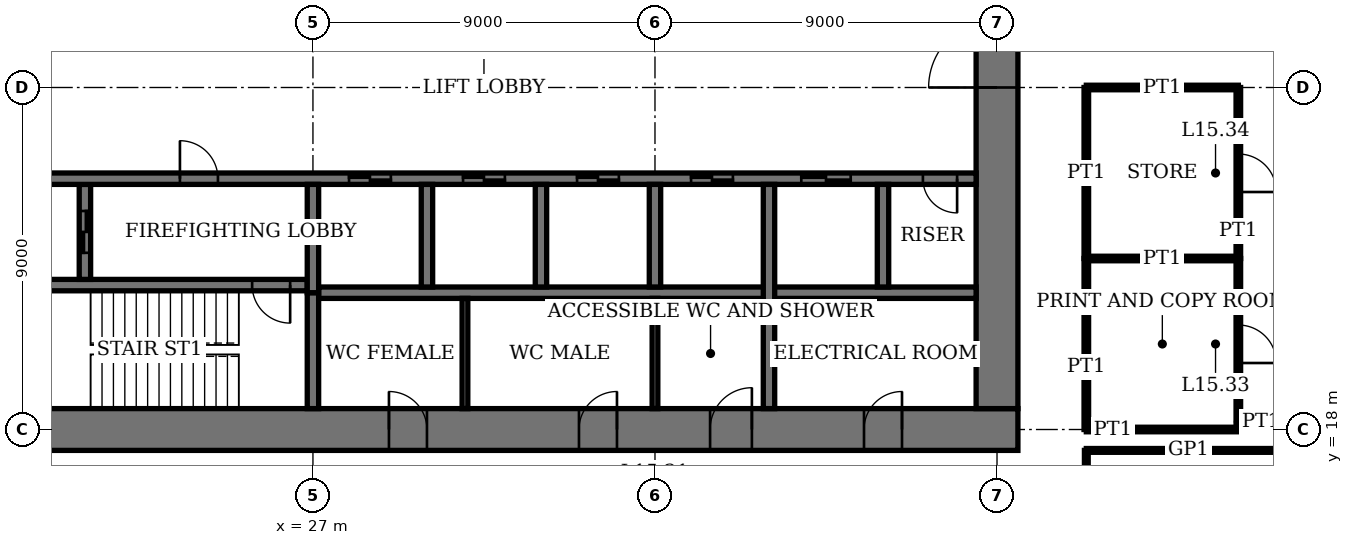
"""IFC4 building model, lengths in metres.
Left out: names, types, materials, properties, quantities, classifications, styles, units other than length and angle.
Written with IfcOpenShell. Run it as: python <this file> out.ifc"""

import sys

from ifc_helpers import new_model, si_unit, direction, frame, frame_2d, origin, place, context, subcontext, project, spatial, rectangle, extrude, element, fill, save


model = new_model("IFC4")
c1 = context("Model", 3, precision=1e-05, world=origin(), true_north=direction((0.0, 1.0)))
c2 = subcontext(c1, "Body", "Model", "MODEL_VIEW")
j1 = project(units=[si_unit("LENGTHUNIT", "METRE"), si_unit("PLANEANGLEUNIT", "RADIAN")], contexts=[c1])
p1 = place(None, origin())
s1 = spatial("IfcSite", under=j1, at=p1, CompositionType="ELEMENT")
p2 = place(p1, origin())
s2 = spatial("IfcBuilding", under=s1, at=p2, CompositionType="ELEMENT")
p3 = place(p2, frame((0.0, 0.0, 63.8)))
s3 = spatial("IfcBuildingStorey", under=s2, at=p3, CompositionType="ELEMENT", Elevation=63.8)
p4 = place(p3, frame((17.45, 18.0, 0.0), z_axis=(0.0, 0.0, 1.0), x_axis=(1.0, 0.0, 0.0)))
e1 = element("IfcWall", 1, at=p4, inside=s3, PredefinedType="SHEAR", context=c2, shape_type="SweptSolid", body=[
    extrude(rectangle(XDim=28.1, YDim=1.1, at=frame_2d((14.05, 0.0))), origin(), (0.0, 0.0, 1.0), 4.0),
])
p5 = place(p4, frame((11.55, 0.0, 0.0)))
e2 = element("IfcOpeningElement", 2, at=p5, cuts=e1, PredefinedType="OPENING", context=c2, shape_type="SweptSolid", body=[
    extrude(rectangle(XDim=1.0, YDim=2.4, at=frame_2d((0.5, 1.2))), frame((0.0, 0.56, 0.0), z_axis=(0.0, -1.0, 0.0), x_axis=(1.0, 0.0, 0.0)), (0.0, 0.0, 1.0), 1.12),
])
p6 = place(p4, frame((16.55, 0.0, 0.0)))
e3 = element("IfcOpeningElement", 3, at=p6, cuts=e1, PredefinedType="OPENING", context=c2, shape_type="SweptSolid", body=[
    extrude(rectangle(XDim=1.0, YDim=2.4, at=frame_2d((0.5, 1.2))), frame((0.0, 0.56, 0.0), z_axis=(0.0, -1.0, 0.0), x_axis=(1.0, 0.0, 0.0)), (0.0, 0.0, 1.0), 1.12),
])
p7 = place(p4, frame((20.0, 0.0, 0.0)))
e4 = element("IfcOpeningElement", 4, at=p7, cuts=e1, PredefinedType="OPENING", context=c2, shape_type="SweptSolid", body=[
    extrude(rectangle(XDim=1.1, YDim=2.4, at=frame_2d((0.55, 1.2))), frame((0.0, 0.56, 0.0), z_axis=(0.0, -1.0, 0.0), x_axis=(1.0, 0.0, 0.0)), (0.0, 0.0, 1.0), 1.12),
])
p8 = place(p4, frame((24.05, 0.0, 0.0)))
e5 = element("IfcOpeningElement", 5, at=p8, cuts=e1, PredefinedType="OPENING", context=c2, shape_type="SweptSolid", body=[
    extrude(rectangle(XDim=1.0, YDim=2.4, at=frame_2d((0.5, 1.2))), frame((0.0, 0.56, 0.0), z_axis=(0.0, -1.0, 0.0), x_axis=(1.0, 0.0, 0.0)), (0.0, 0.0, 1.0), 1.12),
])
p9 = place(p3, frame((45.0, 18.55, 0.0), z_axis=(0.0, 0.0, 1.0), x_axis=(0.0, 1.0, 0.0)))
e6 = element("IfcWall", 6, at=p9, inside=s3, PredefinedType="SHEAR", context=c2, shape_type="SweptSolid", body=[
    extrude(rectangle(XDim=16.9, YDim=1.1, at=frame_2d((8.45, 0.0))), origin(), (0.0, 0.0, 1.0), 4.0),
])
p10 = place(p9, frame((8.45, 0.0, 0.0)))
e7 = element("IfcOpeningElement", 7, at=p10, cuts=e6, PredefinedType="OPENING", context=c2, shape_type="SweptSolid", body=[
    extrude(rectangle(XDim=1.8, YDim=2.4, at=frame_2d((0.9, 1.2))), frame((0.0, 0.56, 0.0), z_axis=(0.0, -1.0, 0.0), x_axis=(1.0, 0.0, 0.0)), (0.0, 0.0, 1.0), 1.12),
])
p11 = place(p3, frame((18.55, 21.8, 0.0), z_axis=(0.0, 0.0, 1.0), x_axis=(1.0, 0.0, 0.0)))
e8 = element("IfcWall", 8, at=p11, inside=s3, PredefinedType="SHEAR", context=c2, shape_type="SweptSolid", body=[
    extrude(rectangle(XDim=8.3, YDim=0.3, at=frame_2d((4.15, 0.0))), origin(), (0.0, 0.0, 1.0), 4.0),
])
p12 = place(p11, frame((6.85, 0.0, 0.0)))
e9 = element("IfcOpeningElement", 9, at=p12, cuts=e8, PredefinedType="OPENING", context=c2, shape_type="SweptSolid", body=[
    extrude(rectangle(XDim=1.0, YDim=2.4, at=frame_2d((0.5, 1.2))), frame((0.0, 0.16, 0.0), z_axis=(0.0, -1.0, 0.0), x_axis=(1.0, 0.0, 0.0)), (0.0, 0.0, 1.0), 0.32),
])
p13 = place(p3, frame((27.0, 18.55, 0.0), z_axis=(0.0, 0.0, 1.0), x_axis=(0.0, 1.0, 0.0)))
e10 = element("IfcWall", 10, at=p13, inside=s3, PredefinedType="SHEAR", context=c2, shape_type="SweptSolid", body=[
    extrude(rectangle(XDim=3.05, YDim=0.3, at=frame_2d((1.525, 0.0))), origin(), (0.0, 0.0, 1.0), 4.0),
])
p14 = place(p3, frame((21.0, 21.95, 0.0), z_axis=(0.0, 0.0, 1.0), x_axis=(0.0, 1.0, 0.0)))
e11 = element("IfcWall", 11, at=p14, inside=s3, PredefinedType="SHEAR", context=c2, shape_type="SweptSolid", body=[
    extrude(rectangle(XDim=2.5, YDim=0.3, at=frame_2d((1.25, 0.0))), origin(), (0.0, 0.0, 1.0), 4.0),
])
p15 = place(p14, frame((0.7, 0.0, 0.0)))
e12 = element("IfcOpeningElement", 12, at=p15, cuts=e11, PredefinedType="OPENING", context=c2, shape_type="SweptSolid", body=[
    extrude(rectangle(XDim=1.1, YDim=2.4, at=frame_2d((0.55, 1.2))), frame((0.0, 0.16, 0.0), z_axis=(0.0, -1.0, 0.0), x_axis=(1.0, 0.0, 0.0)), (0.0, 0.0, 1.0), 0.32),
])
p16 = place(p3, frame((18.55, 24.6, 0.0), z_axis=(0.0, 0.0, 1.0), x_axis=(1.0, 0.0, 0.0)))
e13 = element("IfcWall", 13, at=p16, inside=s3, PredefinedType="SHEAR", context=c2, shape_type="SweptSolid", body=[
    extrude(rectangle(XDim=25.9, YDim=0.3, at=frame_2d((12.95, 0.0))), origin(), (0.0, 0.0, 1.0), 4.0),
])
p17 = place(p16, frame((4.95, 0.0, 0.0)))
e14 = element("IfcOpeningElement", 14, at=p17, cuts=e13, PredefinedType="OPENING", context=c2, shape_type="SweptSolid", body=[
    extrude(rectangle(XDim=1.0, YDim=2.4, at=frame_2d((0.5, 1.2))), frame((0.0, 0.16, 0.0), z_axis=(0.0, -1.0, 0.0), x_axis=(1.0, 0.0, 0.0)), (0.0, 0.0, 1.0), 0.32),
])
p18 = place(p16, frame((24.5, 0.0, 0.0)))
e15 = element("IfcOpeningElement", 15, at=p18, cuts=e13, PredefinedType="OPENING", context=c2, shape_type="SweptSolid", body=[
    extrude(rectangle(XDim=0.9, YDim=2.1, at=frame_2d((0.45, 1.05))), frame((0.0, 0.16, 0.0), z_axis=(0.0, -1.0, 0.0), x_axis=(1.0, 0.0, 0.0)), (0.0, 0.0, 1.0), 0.32),
])
p19 = place(p16, frame((9.4, 0.0, 0.0)))
e16 = element("IfcOpeningElement", 16, at=p19, cuts=e13, PredefinedType="OPENING", context=c2, shape_type="SweptSolid", body=[
    extrude(rectangle(XDim=1.1, YDim=2.4, at=frame_2d((0.55, 1.2))), frame((0.0, 0.16, 0.0), z_axis=(0.0, -1.0, 0.0), x_axis=(1.0, 0.0, 0.0)), (0.0, 0.0, 1.0), 0.32),
])
p20 = place(p16, frame((12.4, 0.0, 0.0)))
e17 = element("IfcOpeningElement", 17, at=p20, cuts=e13, PredefinedType="OPENING", context=c2, shape_type="SweptSolid", body=[
    extrude(rectangle(XDim=1.1, YDim=2.4, at=frame_2d((0.55, 1.2))), frame((0.0, 0.16, 0.0), z_axis=(0.0, -1.0, 0.0), x_axis=(1.0, 0.0, 0.0)), (0.0, 0.0, 1.0), 0.32),
])
p21 = place(p16, frame((15.4, 0.0, 0.0)))
e18 = element("IfcOpeningElement", 18, at=p21, cuts=e13, PredefinedType="OPENING", context=c2, shape_type="SweptSolid", body=[
    extrude(rectangle(XDim=1.1, YDim=2.4, at=frame_2d((0.55, 1.2))), frame((0.0, 0.16, 0.0), z_axis=(0.0, -1.0, 0.0), x_axis=(1.0, 0.0, 0.0)), (0.0, 0.0, 1.0), 0.32),
])
p22 = place(p16, frame((18.4, 0.0, 0.0)))
e19 = element("IfcOpeningElement", 19, at=p22, cuts=e13, PredefinedType="OPENING", context=c2, shape_type="SweptSolid", body=[
    extrude(rectangle(XDim=1.1, YDim=2.4, at=frame_2d((0.55, 1.2))), frame((0.0, 0.16, 0.0), z_axis=(0.0, -1.0, 0.0), x_axis=(1.0, 0.0, 0.0)), (0.0, 0.0, 1.0), 0.32),
])
p23 = place(p16, frame((21.3, 0.0, 0.0)))
e20 = element("IfcOpeningElement", 20, at=p23, cuts=e13, PredefinedType="OPENING", context=c2, shape_type="SweptSolid", body=[
    extrude(rectangle(XDim=1.3, YDim=2.4, at=frame_2d((0.65, 1.2))), frame((0.0, 0.16, 0.0), z_axis=(0.0, -1.0, 0.0), x_axis=(1.0, 0.0, 0.0)), (0.0, 0.0, 1.0), 0.32),
])
p24 = place(p3, frame((27.15, 21.6, 0.0), z_axis=(0.0, 0.0, 1.0), x_axis=(1.0, 0.0, 0.0)))
e21 = element("IfcWall", 21, at=p24, inside=s3, PredefinedType="SHEAR", context=c2, shape_type="SweptSolid", body=[
    extrude(rectangle(XDim=17.3, YDim=0.3, at=frame_2d((8.65, 0.0))), origin(), (0.0, 0.0, 1.0), 4.0),
])
for number, where, z_axis, x_axis in (
    (22, (30.0, 21.75, 0.0), (0.0, 0.0, 1.0), (0.0, 1.0, 0.0)),
    (23, (33.0, 21.75, 0.0), (0.0, 0.0, 1.0), (0.0, 1.0, 0.0)),
    (24, (36.0, 21.75, 0.0), (0.0, 0.0, 1.0), (0.0, 1.0, 0.0)),
):
    element("IfcWall", number, at=place(p3, frame(where, z_axis=z_axis, x_axis=x_axis)), inside=s3, PredefinedType="SHEAR", context=c2, shape_type="SweptSolid", body=[
        extrude(rectangle(XDim=2.7, YDim=0.3, at=frame_2d((1.35, 0.0))), origin(), (0.0, 0.0, 1.0), 4.0),
    ])
p25 = place(p3, frame((39.0, 18.55, 0.0), z_axis=(0.0, 0.0, 1.0), x_axis=(0.0, 1.0, 0.0)))
e25 = element("IfcWall", 25, at=p25, inside=s3, PredefinedType="SHEAR", context=c2, shape_type="SweptSolid", body=[
    extrude(rectangle(XDim=5.9, YDim=0.3, at=frame_2d((2.95, 0.0))), origin(), (0.0, 0.0, 1.0), 4.0),
])
p26 = place(p3, frame((42.0, 21.75, 0.0), z_axis=(0.0, 0.0, 1.0), x_axis=(0.0, 1.0, 0.0)))
e26 = element("IfcWall", 26, at=p26, inside=s3, PredefinedType="SHEAR", context=c2, shape_type="SweptSolid", body=[
    extrude(rectangle(XDim=2.7, YDim=0.3, at=frame_2d((1.35, 0.0))), origin(), (0.0, 0.0, 1.0), 4.0),
])
p27 = place(p3, frame((27.0, 21.6, 0.0), z_axis=(0.0, 0.0, 1.0), x_axis=(0.0, 1.0, 0.0)))
e27 = element("IfcWall", 27, at=p27, inside=s3, PredefinedType="SHEAR", context=c2, shape_type="SweptSolid", body=[
    extrude(rectangle(XDim=2.85, YDim=0.3, at=frame_2d((1.425, 0.0))), origin(), (0.0, 0.0, 1.0), 4.0),
])
p28 = place(p3, frame((47.35, 17.45, 0.0), z_axis=(0.0, 0.0, 1.0), x_axis=(1.0, 0.0, 0.0)))
e28 = element("IfcWall", 28, at=p28, inside=s3, PredefinedType="PARTITIONING", context=c2, shape_type="SweptSolid", body=[
    extrude(rectangle(XDim=5.575, YDim=0.1, at=frame_2d((2.788, 0.0))), origin(), (0.0, 0.0, 1.0), 3.05),
])
p29 = place(p3, frame((47.35, 18.0, 0.0), z_axis=(0.0, 0.0, 1.0), x_axis=(1.0, 0.0, 0.0)))
e29 = element("IfcWall", 29, at=p29, inside=s3, PredefinedType="PARTITIONING", context=c2, shape_type="SweptSolid", body=[
    extrude(rectangle(XDim=4.0, YDim=0.12, at=frame_2d((2.0, 0.0))), origin(), (0.0, 0.0, 1.0), 3.05),
])
p30 = place(p3, frame((47.35, 22.5, 0.0), z_axis=(0.0, 0.0, 1.0), x_axis=(1.0, 0.0, 0.0)))
e30 = element("IfcWall", 30, at=p30, inside=s3, PredefinedType="PARTITIONING", context=c2, shape_type="SweptSolid", body=[
    extrude(rectangle(XDim=4.0, YDim=0.12, at=frame_2d((2.0, 0.0))), origin(), (0.0, 0.0, 1.0), 3.1),
])
p31 = place(p3, frame((47.35, 27.0, 0.0), z_axis=(0.0, 0.0, 1.0), x_axis=(1.0, 0.0, 0.0)))
e31 = element("IfcWall", 31, at=p31, inside=s3, PredefinedType="PARTITIONING", context=c2, shape_type="SweptSolid", body=[
    extrude(rectangle(XDim=4.0, YDim=0.12, at=frame_2d((2.0, 0.0))), origin(), (0.0, 0.0, 1.0), 3.05),
])
for number, where, z_axis, x_axis in (
    (32, (47.35, 18.0, 0.0), (0.0, 0.0, 1.0), (0.0, 1.0, 0.0)),
    (33, (47.35, 22.5, 0.0), (0.0, 0.0, 1.0), (0.0, 1.0, 0.0)),
):
    element("IfcWall", number, at=place(p3, frame(where, z_axis=z_axis, x_axis=x_axis)), inside=s3, PredefinedType="PARTITIONING", context=c2, shape_type="SweptSolid", body=[
        extrude(rectangle(XDim=4.5, YDim=0.12, at=frame_2d((2.25, 0.0))), origin(), (0.0, 0.0, 1.0), 3.75),
    ])
p32 = place(p3, frame((47.35, 15.65, 0.0), z_axis=(0.0, 0.0, 1.0), x_axis=(0.0, 1.0, 0.0)))
e34 = element("IfcWall", 34, at=p32, inside=s3, PredefinedType="PARTITIONING", context=c2, shape_type="SweptSolid", body=[
    extrude(rectangle(XDim=1.8, YDim=0.1, at=frame_2d((0.9, 0.0))), origin(), (0.0, 0.0, 1.0), 3.75),
])
p33 = place(p3, frame((51.35, 18.0, 0.0), z_axis=(0.0, 0.0, 1.0), x_axis=(0.0, 1.0, 0.0)))
e35 = element("IfcWall", 35, at=p33, inside=s3, PredefinedType="PARTITIONING", context=c2, shape_type="SweptSolid", body=[
    extrude(rectangle(XDim=4.5, YDim=0.12, at=frame_2d((2.25, 0.0))), origin(), (0.0, 0.0, 1.0), 3.75),
])
p34 = place(p33, frame((1.75, 0.0, 0.0)))
e36 = element("IfcOpeningElement", 36, at=p34, cuts=e35, PredefinedType="OPENING", context=c2, shape_type="SweptSolid", body=[
    extrude(rectangle(XDim=1.0, YDim=2.4, at=frame_2d((0.5, 1.2))), frame((0.0, 0.07, 0.0), z_axis=(0.0, -1.0, 0.0), x_axis=(1.0, 0.0, 0.0)), (0.0, 0.0, 1.0), 0.14),
])
p35 = place(p3, frame((51.35, 22.5, 0.0), z_axis=(0.0, 0.0, 1.0), x_axis=(0.0, 1.0, 0.0)))
e37 = element("IfcWall", 37, at=p35, inside=s3, PredefinedType="PARTITIONING", context=c2, shape_type="SweptSolid", body=[
    extrude(rectangle(XDim=4.5, YDim=0.12, at=frame_2d((2.25, 0.0))), origin(), (0.0, 0.0, 1.0), 3.75),
])
p36 = place(p35, frame((1.75, 0.0, 0.0)))
e38 = element("IfcOpeningElement", 38, at=p36, cuts=e37, PredefinedType="OPENING", context=c2, shape_type="SweptSolid", body=[
    extrude(rectangle(XDim=1.0, YDim=2.4, at=frame_2d((0.5, 1.2))), frame((0.0, 0.07, 0.0), z_axis=(0.0, -1.0, 0.0), x_axis=(1.0, 0.0, 0.0)), (0.0, 0.0, 1.0), 0.14),
])
for number, where, z_axis, x_axis in (
    (39, (31.0, 18.55, 0.0), (0.0, 0.0, 1.0), (0.0, 1.0, 0.0)),
    (40, (36.0, 18.55, 0.0), (0.0, 0.0, 1.0), (0.0, 1.0, 0.0)),
):
    element("IfcWall", number, at=place(p3, frame(where, z_axis=z_axis, x_axis=x_axis)), inside=s3, PredefinedType="PARTITIONING", context=c2, shape_type="SweptSolid", body=[
        extrude(rectangle(XDim=2.9, YDim=0.15, at=frame_2d((1.45, 0.0))), origin(), (0.0, 0.0, 1.0), 3.75),
    ])
p37 = place(p10, origin())
e41 = element("IfcDoor", 41, at=p37, inside=s3, OperationType="DOUBLE_DOOR_DOUBLE_SWING", PredefinedType="DOOR", context=c2, shape_type="SweptSolid", body=[
    extrude(rectangle(XDim=1.8, YDim=2.4, at=frame_2d((0.9, 1.2))), frame((0.0, 0.03, 0.0), z_axis=(0.0, -1.0, 0.0), x_axis=(1.0, 0.0, 0.0)), (0.0, 0.0, 1.0), 0.06),
    extrude(rectangle(XDim=0.04, YDim=2.4, at=frame_2d((0.02, 1.2))), frame((0.0, 0.55, 0.0), z_axis=(0.0, -1.0, 0.0), x_axis=(1.0, 0.0, 0.0)), (0.0, 0.0, 1.0), 1.1),
    extrude(rectangle(XDim=0.04, YDim=2.4, at=frame_2d((1.78, 1.2))), frame((0.0, 0.55, 0.0), z_axis=(0.0, -1.0, 0.0), x_axis=(1.0, 0.0, 0.0)), (0.0, 0.0, 1.0), 1.1),
    extrude(rectangle(XDim=1.8, YDim=0.04, at=frame_2d((0.9, 2.38))), frame((0.0, 0.55, 0.0), z_axis=(0.0, -1.0, 0.0), x_axis=(1.0, 0.0, 0.0)), (0.0, 0.0, 1.0), 1.1),
])
fill(e7, e41)
p38 = place(p5, origin())
e42 = element("IfcDoor", 42, at=p38, inside=s3, OperationType="SINGLE_SWING_RIGHT", PredefinedType="DOOR", context=c2, shape_type="SweptSolid", body=[
    extrude(rectangle(XDim=1.0, YDim=2.4, at=frame_2d((0.5, 1.2))), frame((0.0, 0.025, 0.0), z_axis=(0.0, -1.0, 0.0), x_axis=(1.0, 0.0, 0.0)), (0.0, 0.0, 1.0), 0.05),
    extrude(rectangle(XDim=0.04, YDim=2.4, at=frame_2d((0.02, 1.2))), frame((0.0, 0.4, 0.0), z_axis=(0.0, -1.0, 0.0), x_axis=(1.0, 0.0, 0.0)), (0.0, 0.0, 1.0), 0.8),
    extrude(rectangle(XDim=0.04, YDim=2.4, at=frame_2d((0.98, 1.2))), frame((0.0, 0.4, 0.0), z_axis=(0.0, -1.0, 0.0), x_axis=(1.0, 0.0, 0.0)), (0.0, 0.0, 1.0), 0.8),
    extrude(rectangle(XDim=1.0, YDim=0.04, at=frame_2d((0.5, 2.38))), frame((0.0, 0.4, 0.0), z_axis=(0.0, -1.0, 0.0), x_axis=(1.0, 0.0, 0.0)), (0.0, 0.0, 1.0), 0.8),
])
fill(e2, e42)
p39 = place(p6, origin())
e43 = element("IfcDoor", 43, at=p39, inside=s3, OperationType="SINGLE_SWING_LEFT", PredefinedType="DOOR", context=c2, shape_type="SweptSolid", body=[
    extrude(rectangle(XDim=1.0, YDim=2.4, at=frame_2d((0.5, 1.2))), frame((0.0, 0.025, 0.0), z_axis=(0.0, -1.0, 0.0), x_axis=(1.0, 0.0, 0.0)), (0.0, 0.0, 1.0), 0.05),
    extrude(rectangle(XDim=0.04, YDim=2.4, at=frame_2d((0.02, 1.2))), frame((0.0, 0.4, 0.0), z_axis=(0.0, -1.0, 0.0), x_axis=(1.0, 0.0, 0.0)), (0.0, 0.0, 1.0), 0.8),
    extrude(rectangle(XDim=0.04, YDim=2.4, at=frame_2d((0.98, 1.2))), frame((0.0, 0.4, 0.0), z_axis=(0.0, -1.0, 0.0), x_axis=(1.0, 0.0, 0.0)), (0.0, 0.0, 1.0), 0.8),
    extrude(rectangle(XDim=1.0, YDim=0.04, at=frame_2d((0.5, 2.38))), frame((0.0, 0.4, 0.0), z_axis=(0.0, -1.0, 0.0), x_axis=(1.0, 0.0, 0.0)), (0.0, 0.0, 1.0), 0.8),
])
fill(e3, e43)
p40 = place(p7, origin())
e44 = element("IfcDoor", 44, at=p40, inside=s3, OperationType="SINGLE_SWING_LEFT", PredefinedType="DOOR", context=c2, shape_type="SweptSolid", body=[
    extrude(rectangle(XDim=1.1, YDim=2.4, at=frame_2d((0.55, 1.2))), frame((0.0, 0.025, 0.0), z_axis=(0.0, -1.0, 0.0), x_axis=(1.0, 0.0, 0.0)), (0.0, 0.0, 1.0), 0.05),
    extrude(rectangle(XDim=0.04, YDim=2.4, at=frame_2d((0.02, 1.2))), frame((0.0, 0.44, 0.0), z_axis=(0.0, -1.0, 0.0), x_axis=(1.0, 0.0, 0.0)), (0.0, 0.0, 1.0), 0.88),
    extrude(rectangle(XDim=0.04, YDim=2.4, at=frame_2d((1.08, 1.2))), frame((0.0, 0.44, 0.0), z_axis=(0.0, -1.0, 0.0), x_axis=(1.0, 0.0, 0.0)), (0.0, 0.0, 1.0), 0.88),
    extrude(rectangle(XDim=1.1, YDim=0.04, at=frame_2d((0.55, 2.38))), frame((0.0, 0.44, 0.0), z_axis=(0.0, -1.0, 0.0), x_axis=(1.0, 0.0, 0.0)), (0.0, 0.0, 1.0), 0.88),
])
fill(e4, e44)
p41 = place(p8, origin())
e45 = element("IfcDoor", 45, at=p41, inside=s3, OperationType="SINGLE_SWING_LEFT", PredefinedType="DOOR", context=c2, shape_type="SweptSolid", body=[
    extrude(rectangle(XDim=1.0, YDim=2.4, at=frame_2d((0.5, 1.2))), frame((0.0, 0.025, 0.0), z_axis=(0.0, -1.0, 0.0), x_axis=(1.0, 0.0, 0.0)), (0.0, 0.0, 1.0), 0.05),
    extrude(rectangle(XDim=0.04, YDim=2.4, at=frame_2d((0.02, 1.2))), frame((0.0, 0.4, 0.0), z_axis=(0.0, -1.0, 0.0), x_axis=(1.0, 0.0, 0.0)), (0.0, 0.0, 1.0), 0.8),
    extrude(rectangle(XDim=0.04, YDim=2.4, at=frame_2d((0.98, 1.2))), frame((0.0, 0.4, 0.0), z_axis=(0.0, -1.0, 0.0), x_axis=(1.0, 0.0, 0.0)), (0.0, 0.0, 1.0), 0.8),
    extrude(rectangle(XDim=1.0, YDim=0.04, at=frame_2d((0.5, 2.38))), frame((0.0, 0.4, 0.0), z_axis=(0.0, -1.0, 0.0), x_axis=(1.0, 0.0, 0.0)), (0.0, 0.0, 1.0), 0.8),
])
fill(e5, e45)
p42 = place(p12, origin())
e46 = element("IfcDoor", 46, at=p42, inside=s3, OperationType="SINGLE_SWING_RIGHT", PredefinedType="DOOR", context=c2, shape_type="SweptSolid", body=[
    extrude(rectangle(XDim=1.0, YDim=2.4, at=frame_2d((0.5, 1.2))), frame((0.0, 0.03, 0.0), z_axis=(0.0, -1.0, 0.0), x_axis=(1.0, 0.0, 0.0)), (0.0, 0.0, 1.0), 0.06),
])
fill(e9, e46)
p43 = place(p17, origin())
e47 = element("IfcDoor", 47, at=p43, inside=s3, OperationType="SINGLE_SWING_RIGHT", PredefinedType="DOOR", context=c2, shape_type="SweptSolid", body=[
    extrude(rectangle(XDim=1.0, YDim=2.4, at=frame_2d((0.5, 1.2))), frame((0.0, 0.03, 0.0), z_axis=(0.0, -1.0, 0.0), x_axis=(1.0, 0.0, 0.0)), (0.0, 0.0, 1.0), 0.06),
])
fill(e14, e47)
p44 = place(p18, origin())
e48 = element("IfcDoor", 48, at=p44, inside=s3, OperationType="SINGLE_SWING_RIGHT", PredefinedType="DOOR", context=c2, shape_type="SweptSolid", body=[
    extrude(rectangle(XDim=0.9, YDim=2.1, at=frame_2d((0.45, 1.05))), frame((0.0, 0.03, 0.0), z_axis=(0.0, -1.0, 0.0), x_axis=(1.0, 0.0, 0.0)), (0.0, 0.0, 1.0), 0.06),
])
fill(e15, e48)
p45 = place(p34, origin())
e49 = element("IfcDoor", 49, at=p45, inside=s3, OperationType="SINGLE_SWING_LEFT", PredefinedType="DOOR", context=c2, shape_type="SweptSolid", body=[
    extrude(rectangle(XDim=1.0, YDim=2.4, at=frame_2d((0.5, 1.2))), frame((0.0, 0.025, 0.0), z_axis=(0.0, -1.0, 0.0), x_axis=(1.0, 0.0, 0.0)), (0.0, 0.0, 1.0), 0.05),
])
fill(e36, e49)
p46 = place(p36, origin())
e50 = element("IfcDoor", 50, at=p46, inside=s3, OperationType="SINGLE_SWING_LEFT", PredefinedType="DOOR", context=c2, shape_type="SweptSolid", body=[
    extrude(rectangle(XDim=1.0, YDim=2.4, at=frame_2d((0.5, 1.2))), frame((0.0, 0.025, 0.0), z_axis=(0.0, -1.0, 0.0), x_axis=(1.0, 0.0, 0.0)), (0.0, 0.0, 1.0), 0.05),
])
fill(e38, e50)
p47 = place(p19, origin())
e51 = element("IfcDoor", 51, at=p47, inside=s3, OperationType="DOUBLE_DOOR_SLIDING", PredefinedType="DOOR", context=c2, shape_type="SweptSolid", body=[
    extrude(rectangle(XDim=1.1, YDim=2.4, at=frame_2d((0.55, 1.2))), frame((0.0, 0.02, 0.0), z_axis=(0.0, -1.0, 0.0), x_axis=(1.0, 0.0, 0.0)), (0.0, 0.0, 1.0), 0.04),
])
fill(e16, e51)
p48 = place(p20, origin())
e52 = element("IfcDoor", 52, at=p48, inside=s3, OperationType="DOUBLE_DOOR_SLIDING", PredefinedType="DOOR", context=c2, shape_type="SweptSolid", body=[
    extrude(rectangle(XDim=1.1, YDim=2.4, at=frame_2d((0.55, 1.2))), frame((0.0, 0.02, 0.0), z_axis=(0.0, -1.0, 0.0), x_axis=(1.0, 0.0, 0.0)), (0.0, 0.0, 1.0), 0.04),
])
fill(e17, e52)
p49 = place(p21, origin())
e53 = element("IfcDoor", 53, at=p49, inside=s3, OperationType="DOUBLE_DOOR_SLIDING", PredefinedType="DOOR", context=c2, shape_type="SweptSolid", body=[
    extrude(rectangle(XDim=1.1, YDim=2.4, at=frame_2d((0.55, 1.2))), frame((0.0, 0.02, 0.0), z_axis=(0.0, -1.0, 0.0), x_axis=(1.0, 0.0, 0.0)), (0.0, 0.0, 1.0), 0.04),
])
fill(e18, e53)
p50 = place(p22, origin())
e54 = element("IfcDoor", 54, at=p50, inside=s3, OperationType="DOUBLE_DOOR_SLIDING", PredefinedType="DOOR", context=c2, shape_type="SweptSolid", body=[
    extrude(rectangle(XDim=1.1, YDim=2.4, at=frame_2d((0.55, 1.2))), frame((0.0, 0.02, 0.0), z_axis=(0.0, -1.0, 0.0), x_axis=(1.0, 0.0, 0.0)), (0.0, 0.0, 1.0), 0.04),
])
fill(e19, e54)
p51 = place(p23, origin())
e55 = element("IfcDoor", 55, at=p51, inside=s3, OperationType="DOUBLE_DOOR_SLIDING", PredefinedType="DOOR", context=c2, shape_type="SweptSolid", body=[
    extrude(rectangle(XDim=1.3, YDim=2.4, at=frame_2d((0.65, 1.2))), frame((0.0, 0.02, 0.0), z_axis=(0.0, -1.0, 0.0), x_axis=(1.0, 0.0, 0.0)), (0.0, 0.0, 1.0), 0.04),
])
fill(e20, e55)
p52 = place(p15, origin())
e56 = element("IfcDoor", 56, at=p52, inside=s3, OperationType="DOUBLE_DOOR_SLIDING", PredefinedType="DOOR", context=c2, shape_type="SweptSolid", body=[
    extrude(rectangle(XDim=1.1, YDim=2.4, at=frame_2d((0.55, 1.2))), frame((0.0, 0.03, 0.0), z_axis=(0.0, -1.0, 0.0), x_axis=(1.0, 0.0, 0.0)), (0.0, 0.0, 1.0), 0.06),
])
fill(e12, e56)
save(model, sys.argv[1])
